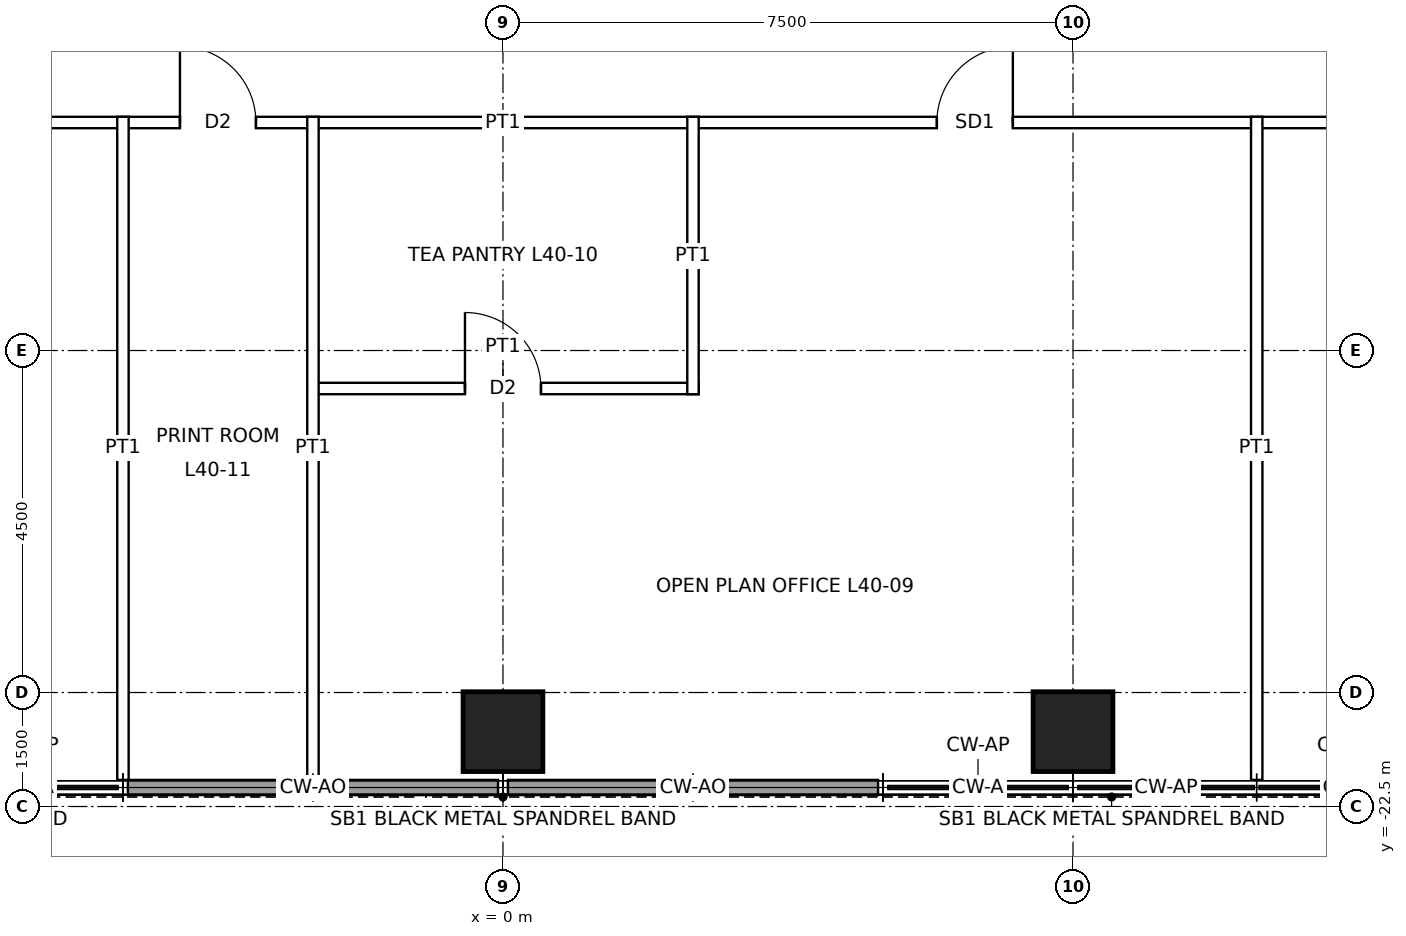
"""IFC4 building model, lengths in metres.
Left out: names, types, materials, properties, quantities, classifications, styles, units other than length and angle.
Written with IfcOpenShell. Run it as: python <this file> out.ifc"""

import sys

from ifc_helpers import new_model, si_unit, direction, frame, frame_2d, origin, origin_2d, place, context, subcontext, project, spatial, rectangle, hollow_rectangle, extrude, element, fill, save


model = new_model("IFC4")
c1 = context("Model", 3, precision=1e-05, world=origin(), true_north=direction((0.0, 1.0)))
c2 = subcontext(c1, "Body", "Model", "MODEL_VIEW")
j1 = project(units=[si_unit("LENGTHUNIT", "METRE"), si_unit("PLANEANGLEUNIT", "RADIAN")], contexts=[c1])
p1 = place(None, origin())
s1 = spatial("IfcSite", under=j1, at=p1, CompositionType="ELEMENT")
p2 = place(p1, origin())
s2 = spatial("IfcBuilding", under=s1, at=p2, CompositionType="ELEMENT")
p3 = place(p2, frame((0.0, 0.0, 193.9)))
s3 = spatial("IfcBuildingStorey", under=s2, at=p3, CompositionType="ELEMENT", Elevation=193.9)
for number, where, z_axis, x_axis in (
    (1, (7.5, -21.515, 0.0), (0.0, 0.0, 1.0), (1.0, 0.0, 0.0)),
    (2, (0.0, -21.515, 0.0), (0.0, 0.0, 1.0), (1.0, 0.0, 0.0)),
):
    element("IfcColumn", number, at=place(p3, frame(where, z_axis=z_axis, x_axis=x_axis)), inside=s3, PredefinedType="COLUMN", context=c2, shape_type="SweptSolid", body=[
        extrude(hollow_rectangle(XDim=1.05, YDim=1.05, WallThickness=0.07, at=origin_2d()), origin(), (0.0, 0.0, 1.0), 4.0),
    ])
for number, where, z_axis, x_axis in (
    (3, (4.935, -22.25, 0.0), (0.0, 0.0, 1.0), (-1.0, 0.0, 0.0)),
    (4, (2.468, -22.25, 0.0), (0.0, 0.0, 1.0), (-1.0, 0.0, 0.0)),
    (5, (-0.065, -22.25, 0.0), (0.0, 0.0, 1.0), (-1.0, 0.0, 0.0)),
    (6, (-2.532, -22.25, 0.0), (0.0, 0.0, 1.0), (-1.0, 0.0, 0.0)),
):
    element("IfcWall", number, at=place(p3, frame(where, z_axis=z_axis, x_axis=x_axis)), inside=s3, PredefinedType="SOLIDWALL", context=c2, shape_type="SweptSolid", body=[
        extrude(rectangle(XDim=2.403, YDim=0.2, at=frame_2d((1.201, 0.0))), origin(), (0.0, 0.0, 1.0), 3.85),
    ])
p4 = place(p3, frame((-2.575, -17.0, 0.0), z_axis=(0.0, 0.0, 1.0), x_axis=(1.0, 0.0, 0.0)))
e7 = element("IfcWall", 7, at=p4, inside=s3, PredefinedType="PARTITIONING", context=c2, shape_type="SweptSolid", body=[
    extrude(rectangle(XDim=5.15, YDim=0.15, at=frame_2d((2.575, 0.0))), origin(), (0.0, 0.0, 1.0), 3.85),
])
p5 = place(p4, frame((2.075, 0.0, 0.0)))
e8 = element("IfcOpeningElement", 8, at=p5, cuts=e7, PredefinedType="OPENING", context=c2, shape_type="SweptSolid", body=[
    extrude(rectangle(XDim=1.0, YDim=2.1, at=frame_2d((0.5, 1.05))), frame((0.0, 0.085, 0.0), z_axis=(0.0, -1.0, 0.0), x_axis=(1.0, 0.0, 0.0)), (0.0, 0.0, 1.0), 0.17),
])
p6 = place(p3, frame((-13.575, -13.5, 0.0), z_axis=(0.0, 0.0, 1.0), x_axis=(1.0, 0.0, 0.0)))
e9 = element("IfcWall", 9, at=p6, inside=s3, PredefinedType="PARTITIONING", context=c2, shape_type="SweptSolid", body=[
    extrude(rectangle(XDim=27.15, YDim=0.15, at=frame_2d((13.575, 0.0))), origin(), (0.0, 0.0, 1.0), 3.85),
])
p7 = place(p6, frame((19.283, 0.0, 0.0)))
e10 = element("IfcOpeningElement", 10, at=p7, cuts=e9, PredefinedType="OPENING", context=c2, shape_type="SweptSolid", body=[
    extrude(rectangle(XDim=1.0, YDim=2.4, at=frame_2d((0.5, 1.2))), frame((0.0, 0.085, 0.0), z_axis=(0.0, -1.0, 0.0), x_axis=(1.0, 0.0, 0.0)), (0.0, 0.0, 1.0), 0.17),
])
p8 = place(p6, frame((9.325, 0.0, 0.0)))
e11 = element("IfcOpeningElement", 11, at=p8, cuts=e9, PredefinedType="OPENING", context=c2, shape_type="SweptSolid", body=[
    extrude(rectangle(XDim=1.0, YDim=2.1, at=frame_2d((0.5, 1.05))), frame((0.0, 0.085, 0.0), z_axis=(0.0, -1.0, 0.0), x_axis=(1.0, 0.0, 0.0)), (0.0, 0.0, 1.0), 0.17),
])
p9 = place(p6, frame((3.825, 0.0, 0.0)))
e12 = element("IfcOpeningElement", 12, at=p9, cuts=e9, PredefinedType="OPENING", context=c2, shape_type="SweptSolid", body=[
    extrude(rectangle(XDim=1.0, YDim=2.4, at=frame_2d((0.5, 1.2))), frame((0.0, 0.085, 0.0), z_axis=(0.0, -1.0, 0.0), x_axis=(1.0, 0.0, 0.0)), (0.0, 0.0, 1.0), 0.17),
])
p10 = place(p6, frame((25.318, 0.0, 0.0)))
e13 = element("IfcOpeningElement", 13, at=p10, cuts=e9, PredefinedType="OPENING", context=c2, shape_type="SweptSolid", body=[
    extrude(rectangle(XDim=1.0, YDim=2.4, at=frame_2d((0.5, 1.2))), frame((0.0, 0.085, 0.0), z_axis=(0.0, -1.0, 0.0), x_axis=(1.0, 0.0, 0.0)), (0.0, 0.0, 1.0), 0.17),
])
for number, where, z_axis, x_axis in (
    (14, (-5.0, -22.15, 0.0), (0.0, 0.0, 1.0), (0.0, 1.0, 0.0)),
    (15, (-2.5, -22.15, 0.0), (0.0, 0.0, 1.0), (0.0, 1.0, 0.0)),
):
    element("IfcWall", number, at=place(p3, frame(where, z_axis=z_axis, x_axis=x_axis)), inside=s3, PredefinedType="PARTITIONING", context=c2, shape_type="SweptSolid", body=[
        extrude(rectangle(XDim=8.725, YDim=0.15, at=frame_2d((4.362, 0.0))), origin(), (0.0, 0.0, 1.0), 3.85),
    ])
p11 = place(p3, frame((2.5, -17.075, 0.0), z_axis=(0.0, 0.0, 1.0), x_axis=(0.0, 1.0, 0.0)))
e16 = element("IfcWall", 16, at=p11, inside=s3, PredefinedType="PARTITIONING", context=c2, shape_type="SweptSolid", body=[
    extrude(rectangle(XDim=3.65, YDim=0.15, at=frame_2d((1.825, 0.0))), origin(), (0.0, 0.0, 1.0), 3.85),
])
p12 = place(p3, frame((9.917, -22.15, 0.0), z_axis=(0.0, 0.0, 1.0), x_axis=(0.0, 1.0, 0.0)))
e17 = element("IfcWall", 17, at=p12, inside=s3, PredefinedType="PARTITIONING", context=c2, shape_type="SweptSolid", body=[
    extrude(rectangle(XDim=8.725, YDim=0.15, at=frame_2d((4.362, 0.0))), origin(), (0.0, 0.0, 1.0), 3.85),
])
p13 = place(p7, origin())
e18 = element("IfcDoor", 18, at=p13, inside=s3, OperationType="SINGLE_SWING_RIGHT", PredefinedType="DOOR", context=c2, shape_type="SweptSolid", body=[
    extrude(rectangle(XDim=1.0, YDim=2.4, at=frame_2d((0.5, 1.2))), frame((0.0, 0.025, 0.0), z_axis=(0.0, -1.0, 0.0), x_axis=(1.0, 0.0, 0.0)), (0.0, 0.0, 1.0), 0.05),
])
fill(e10, e18)
p14 = place(p5, origin())
e19 = element("IfcDoor", 19, at=p14, inside=s3, OperationType="SINGLE_SWING_LEFT", PredefinedType="DOOR", context=c2, shape_type="SweptSolid", body=[
    extrude(rectangle(XDim=1.0, YDim=2.1, at=frame_2d((0.5, 1.05))), frame((0.0, 0.025, 0.0), z_axis=(0.0, -1.0, 0.0), x_axis=(1.0, 0.0, 0.0)), (0.0, 0.0, 1.0), 0.05),
])
fill(e8, e19)
p15 = place(p8, origin())
e20 = element("IfcDoor", 20, at=p15, inside=s3, OperationType="SINGLE_SWING_LEFT", PredefinedType="DOOR", context=c2, shape_type="SweptSolid", body=[
    extrude(rectangle(XDim=1.0, YDim=2.1, at=frame_2d((0.5, 1.05))), frame((0.0, 0.025, 0.0), z_axis=(0.0, -1.0, 0.0), x_axis=(1.0, 0.0, 0.0)), (0.0, 0.0, 1.0), 0.05),
])
fill(e11, e20)
save(model, sys.argv[1])
